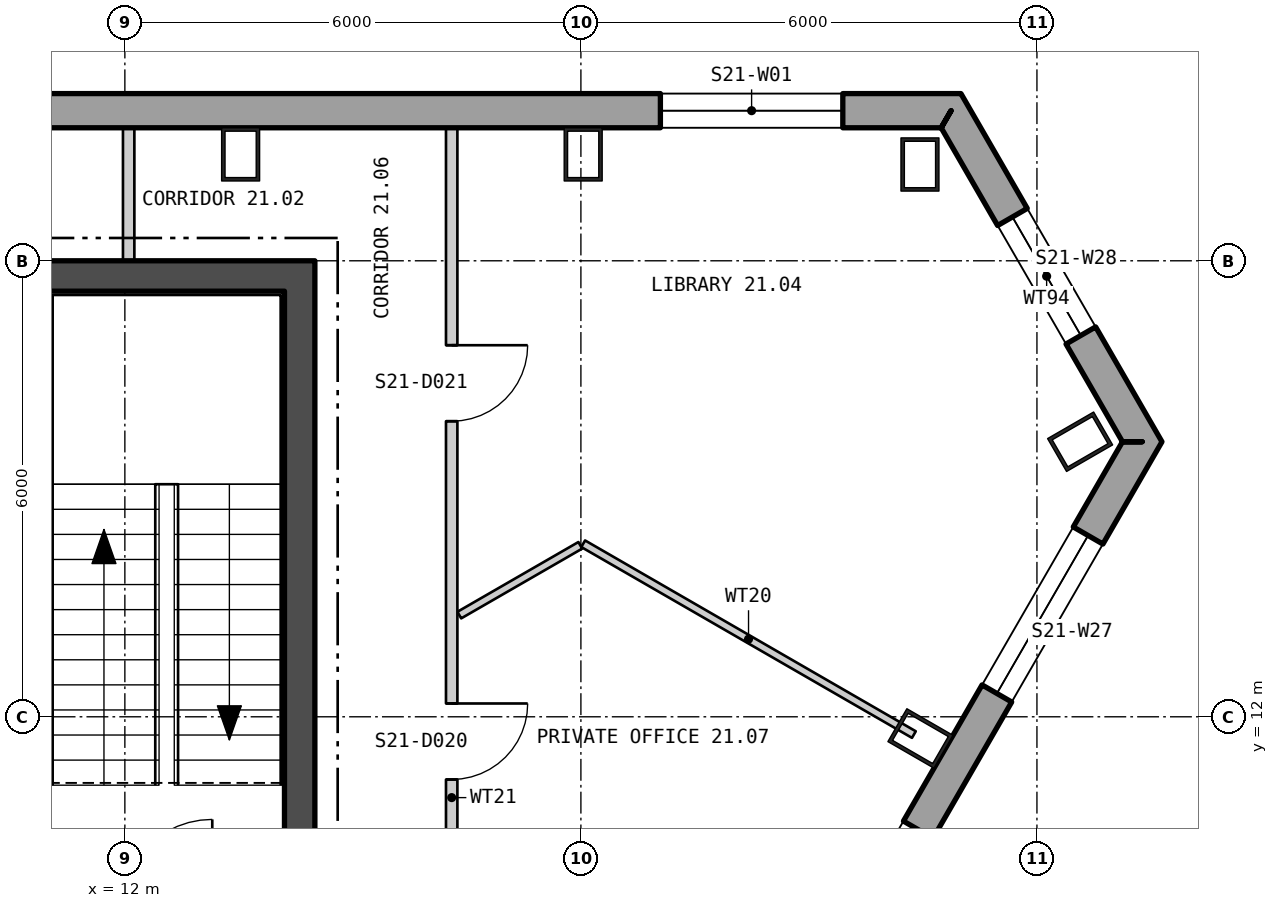
"""IFC4 building model, lengths in metres.
Left out: names, types, materials, properties, quantities, classifications, styles, units other than length and angle.
Written with IfcOpenShell. Run it as: python <this file> out.ifc"""

import sys

from ifc_helpers import new_model, si_unit, direction, frame, frame_2d, origin, origin_2d, place, context, subcontext, project, spatial, polyline, rectangle, hollow_rectangle, outline, extrude, element, fill, save


model = new_model("IFC4")
c1 = context("Model", 3, precision=1e-05, world=origin(), true_north=direction((0.0, 1.0)))
c2 = subcontext(c1, "Body", "Model", "MODEL_VIEW")
j1 = project(units=[si_unit("LENGTHUNIT", "METRE"), si_unit("PLANEANGLEUNIT", "RADIAN")], contexts=[c1])
p1 = place(None, origin())
s1 = spatial("IfcSite", under=j1, at=p1, CompositionType="ELEMENT")
p2 = place(p1, origin())
s2 = spatial("IfcBuilding", under=s1, at=p2, CompositionType="ELEMENT")
p3 = place(p2, frame((0.0, 0.0, 280.5)))
s3 = spatial("IfcBuildingStorey", under=s2, at=p3, CompositionType="ELEMENT", Elevation=280.5)
for number, where, z_axis, x_axis in (
    (1, (22.461, 19.267, 0.0), (0.0, 0.0, 1.0), (-1.0, 0.0, 0.0)),
    (2, (18.03, 19.4, 0.0), (0.0, 0.0, 1.0), (-1.0, 0.0, 0.0)),
    (3, (13.523, 19.4, 0.0), (0.0, 0.0, 1.0), (-1.0, 0.0, 0.0)),
    (4, (22.467, 11.715, 0.0), (0.0, 0.0, 1.0), (0.5, 0.866, 0.0)),
    (5, (24.568, 15.619, 0.0), (0.0, 0.0, 1.0), (-0.5, 0.866, 0.0)),
):
    element("IfcColumn", number, at=place(p3, frame(where, z_axis=z_axis, x_axis=x_axis)), inside=s3, PredefinedType="COLUMN", context=c2, shape_type="SweptSolid", body=[
        extrude(hollow_rectangle(XDim=0.5, YDim=0.7, WallThickness=0.045, at=origin_2d()), origin(), (0.0, 0.0, 1.0), 3.9),
    ])
p4 = place(p3, frame((22.87, 19.975, -0.4), z_axis=(0.0, 0.0, 1.0), x_axis=(-1.0, 0.0, 0.0)))
e6 = element("IfcWall", 6, at=p4, inside=s3, PredefinedType="SOLIDWALL", context=c2, shape_type="SweptSolid", body=[
    extrude(outline(polyline([(-0.13, -0.225), (45.87, -0.225), (45.61, 0.225), (0.13, 0.225), (-0.13, -0.225)])), origin(), (0.0, 0.0, 1.0), 3.9),
])
p5 = place(p4, frame((1.424, 0.0, 1.3)))
e7 = element("IfcOpeningElement", 7, at=p5, cuts=e6, PredefinedType="OPENING", context=c2, shape_type="SweptSolid", body=[
    extrude(rectangle(XDim=2.4, YDim=2.0, at=frame_2d((1.2, 1.0))), frame((0.0, 0.235, 0.0), z_axis=(0.0, -1.0, 0.0), x_axis=(1.0, 0.0, 0.0)), (0.0, 0.0, 1.0), 0.47),
])
p6 = place(p4, frame((14.909, 0.0, 1.3)))
e8 = element("IfcOpeningElement", 8, at=p6, cuts=e6, PredefinedType="OPENING", context=c2, shape_type="SweptSolid", body=[
    extrude(rectangle(XDim=2.4, YDim=2.0, at=frame_2d((1.2, 1.0))), frame((0.0, 0.235, 0.0), z_axis=(0.0, -1.0, 0.0), x_axis=(1.0, 0.0, 0.0)), (0.0, 0.0, 1.0), 0.47),
])
p7 = place(p4, frame((19.416, 0.0, 1.3)))
e9 = element("IfcOpeningElement", 9, at=p7, cuts=e6, PredefinedType="OPENING", context=c2, shape_type="SweptSolid", body=[
    extrude(rectangle(XDim=2.4, YDim=2.0, at=frame_2d((1.2, 1.0))), frame((0.0, 0.235, 0.0), z_axis=(0.0, -1.0, 0.0), x_axis=(1.0, 0.0, 0.0)), (0.0, 0.0, 1.0), 0.47),
])
p8 = place(p4, frame((23.924, 0.0, 1.3)))
e10 = element("IfcOpeningElement", 10, at=p8, cuts=e6, PredefinedType="OPENING", context=c2, shape_type="SweptSolid", body=[
    extrude(rectangle(XDim=2.4, YDim=2.0, at=frame_2d((1.2, 1.0))), frame((0.0, 0.235, 0.0), z_axis=(0.0, -1.0, 0.0), x_axis=(1.0, 0.0, 0.0)), (0.0, 0.0, 1.0), 0.47),
])
p9 = place(p4, frame((28.431, 0.0, 1.3)))
e11 = element("IfcOpeningElement", 11, at=p9, cuts=e6, PredefinedType="OPENING", context=c2, shape_type="SweptSolid", body=[
    extrude(rectangle(XDim=2.4, YDim=2.0, at=frame_2d((1.2, 1.0))), frame((0.0, 0.235, 0.0), z_axis=(0.0, -1.0, 0.0), x_axis=(1.0, 0.0, 0.0)), (0.0, 0.0, 1.0), 0.47),
])
p10 = place(p4, frame((32.939, 0.0, 1.3)))
e12 = element("IfcOpeningElement", 12, at=p10, cuts=e6, PredefinedType="OPENING", context=c2, shape_type="SweptSolid", body=[
    extrude(rectangle(XDim=2.4, YDim=2.0, at=frame_2d((1.2, 1.0))), frame((0.0, 0.235, 0.0), z_axis=(0.0, -1.0, 0.0), x_axis=(1.0, 0.0, 0.0)), (0.0, 0.0, 1.0), 0.47),
])
p11 = place(p4, frame((41.916, 0.0, 1.3)))
e13 = element("IfcOpeningElement", 13, at=p11, cuts=e6, PredefinedType="OPENING", context=c2, shape_type="SweptSolid", body=[
    extrude(rectangle(XDim=2.4, YDim=2.0, at=frame_2d((1.2, 1.0))), frame((0.0, 0.235, 0.0), z_axis=(0.0, -1.0, 0.0), x_axis=(1.0, 0.0, 0.0)), (0.0, 0.0, 1.0), 0.47),
])
p12 = place(p3, frame((2.515, -23.993, -0.18), z_axis=(0.0, 0.0, 1.0), x_axis=(0.500000711659, 0.866024992908, 0.0)))
e14 = element("IfcWall", 14, at=p12, inside=s3, PredefinedType="SOLIDWALL", context=c2, shape_type="SweptSolid", body=[
    extrude(outline(polyline([(-0.13, -0.225), (45.87, -0.225), (45.61, 0.225), (0.13, 0.225), (-0.13, -0.225)])), origin(), (0.0, 0.0, 1.0), 3.68),
])
p13 = place(p12, frame((1.424, 0.0, 1.08)))
e15 = element("IfcOpeningElement", 15, at=p13, cuts=e14, PredefinedType="OPENING", context=c2, shape_type="SweptSolid", body=[
    extrude(rectangle(XDim=2.4, YDim=2.0, at=frame_2d((1.2, 1.0))), frame((0.0, 0.235, 0.0), z_axis=(0.0, -1.0, 0.0), x_axis=(1.0, 0.0, 0.0)), (0.0, 0.0, 1.0), 0.47),
])
p14 = place(p12, frame((5.893, 0.0, 1.08)))
e16 = element("IfcOpeningElement", 16, at=p14, cuts=e14, PredefinedType="OPENING", context=c2, shape_type="SweptSolid", body=[
    extrude(rectangle(XDim=2.4, YDim=2.0, at=frame_2d((1.2, 1.0))), frame((0.0, 0.235, 0.0), z_axis=(0.0, -1.0, 0.0), x_axis=(1.0, 0.0, 0.0)), (0.0, 0.0, 1.0), 0.47),
])
p15 = place(p12, frame((10.401, 0.0, 1.08)))
e17 = element("IfcOpeningElement", 17, at=p15, cuts=e14, PredefinedType="OPENING", context=c2, shape_type="SweptSolid", body=[
    extrude(rectangle(XDim=2.4, YDim=2.0, at=frame_2d((1.2, 1.0))), frame((0.0, 0.235, 0.0), z_axis=(0.0, -1.0, 0.0), x_axis=(1.0, 0.0, 0.0)), (0.0, 0.0, 1.0), 0.47),
])
p16 = place(p12, frame((14.909, 0.0, 1.08)))
e18 = element("IfcOpeningElement", 18, at=p16, cuts=e14, PredefinedType="OPENING", context=c2, shape_type="SweptSolid", body=[
    extrude(rectangle(XDim=2.4, YDim=2.0, at=frame_2d((1.2, 1.0))), frame((0.0, 0.235, 0.0), z_axis=(0.0, -1.0, 0.0), x_axis=(1.0, 0.0, 0.0)), (0.0, 0.0, 1.0), 0.47),
])
p17 = place(p12, frame((19.416, 0.0, 1.08)))
e19 = element("IfcOpeningElement", 19, at=p17, cuts=e14, PredefinedType="OPENING", context=c2, shape_type="SweptSolid", body=[
    extrude(rectangle(XDim=2.4, YDim=2.0, at=frame_2d((1.2, 1.0))), frame((0.0, 0.235, 0.0), z_axis=(0.0, -1.0, 0.0), x_axis=(1.0, 0.0, 0.0)), (0.0, 0.0, 1.0), 0.47),
])
p18 = place(p12, frame((28.431, 0.0, 1.08)))
e20 = element("IfcOpeningElement", 20, at=p18, cuts=e14, PredefinedType="OPENING", context=c2, shape_type="SweptSolid", body=[
    extrude(rectangle(XDim=2.4, YDim=2.0, at=frame_2d((1.2, 1.0))), frame((0.0, 0.235, 0.0), z_axis=(0.0, -1.0, 0.0), x_axis=(1.0, 0.0, 0.0)), (0.0, 0.0, 1.0), 0.47),
])
p19 = place(p12, frame((37.447, 0.0, 1.08)))
e21 = element("IfcOpeningElement", 21, at=p19, cuts=e14, PredefinedType="OPENING", context=c2, shape_type="SweptSolid", body=[
    extrude(rectangle(XDim=2.4, YDim=2.0, at=frame_2d((1.2, 1.0))), frame((0.0, 0.235, 0.0), z_axis=(0.0, -1.0, 0.0), x_axis=(1.0, 0.0, 0.0)), (0.0, 0.0, 1.0), 0.47),
])
p20 = place(p12, frame((41.916, 0.0, 1.08)))
e22 = element("IfcOpeningElement", 22, at=p20, cuts=e14, PredefinedType="OPENING", context=c2, shape_type="SweptSolid", body=[
    extrude(rectangle(XDim=2.4, YDim=2.0, at=frame_2d((1.2, 1.0))), frame((0.0, 0.235, 0.0), z_axis=(0.0, -1.0, 0.0), x_axis=(1.0, 0.0, 0.0)), (0.0, 0.0, 1.0), 0.47),
])
p21 = place(p3, frame((25.385, 15.619, -0.4), z_axis=(0.0, 0.0, 1.0), x_axis=(-0.49999836324, 0.866026348766, 0.0)))
e23 = element("IfcWall", 23, at=p21, inside=s3, PredefinedType="SOLIDWALL", context=c2, shape_type="SweptSolid", body=[
    extrude(outline(polyline([(-0.13, -0.225), (5.16, -0.225), (4.9, 0.225), (0.13, 0.225), (-0.13, -0.225)])), origin(), (0.0, 0.0, 1.0), 3.9),
])
p22 = place(p21, frame((1.615, 0.0, 1.3)))
e24 = element("IfcOpeningElement", 24, at=p22, cuts=e23, PredefinedType="OPENING", context=c2, shape_type="SweptSolid", body=[
    extrude(rectangle(XDim=1.8, YDim=2.0, at=frame_2d((0.9, 1.0))), frame((0.0, 0.235, 0.0), z_axis=(0.0, -1.0, 0.0), x_axis=(1.0, 0.0, 0.0)), (0.0, 0.0, 1.0), 0.47),
])
p23 = place(p3, frame((-14.5, 17.8, 0.0), z_axis=(0.0, 0.0, 1.0), x_axis=(1.0, 0.0, 0.0)))
e25 = element("IfcWall", 25, at=p23, inside=s3, PredefinedType="SHEAR", context=c2, shape_type="SweptSolid", body=[
    extrude(rectangle(XDim=29.0, YDim=0.4, at=frame_2d((14.5, 0.0))), origin(), (0.0, 0.0, 1.0), 3.7),
])
p24 = place(p3, frame((14.3, 4.4, 0.0), z_axis=(0.0, 0.0, 1.0), x_axis=(0.0, 1.0, 0.0)))
e26 = element("IfcWall", 26, at=p24, inside=s3, PredefinedType="SHEAR", context=c2, shape_type="SweptSolid", body=[
    extrude(rectangle(XDim=13.2, YDim=0.4, at=frame_2d((6.6, 0.0))), origin(), (0.0, 0.0, 1.0), 3.7),
])
p25 = place(p24, frame((3.05, 0.0, 0.0)))
e27 = element("IfcOpeningElement", 27, at=p25, cuts=e26, PredefinedType="OPENING", context=c2, shape_type="SweptSolid", body=[
    extrude(rectangle(XDim=1.5, YDim=2.1, at=frame_2d((0.75, 1.05))), frame((0.0, 0.21, 0.0), z_axis=(0.0, -1.0, 0.0), x_axis=(1.0, 0.0, 0.0)), (0.0, 0.0, 1.0), 0.42),
])
p26 = place(p3, frame((12.05, 18.0, 0.0), z_axis=(0.0, 0.0, 1.0), x_axis=(0.0, 1.0, 0.0)))
e28 = element("IfcWall", 28, at=p26, inside=s3, PredefinedType="PARTITIONING", context=c2, shape_type="SweptSolid", body=[
    extrude(rectangle(XDim=1.75, YDim=0.15, at=frame_2d((0.875, 0.0))), origin(), (0.0, 0.0, 1.0), 3.7),
])
p27 = place(p3, frame((16.3, 2.125, 0.0), z_axis=(0.0, 0.0, 1.0), x_axis=(0.0, 1.0, 0.0)))
e29 = element("IfcWall", 29, at=p27, inside=s3, PredefinedType="PARTITIONING", context=c2, shape_type="SweptSolid", body=[
    extrude(rectangle(XDim=17.623, YDim=0.15, at=frame_2d((8.812, 0.0))), origin(), (0.0, 0.0, 1.0), 3.7),
])
p28 = place(p27, frame((3.377, 0.0, 0.0)))
e30 = element("IfcOpeningElement", 30, at=p28, cuts=e29, PredefinedType="OPENING", context=c2, shape_type="SweptSolid", body=[
    extrude(rectangle(XDim=1.0, YDim=2.1, at=frame_2d((0.5, 1.05))), frame((0.0, 0.085, 0.0), z_axis=(0.0, -1.0, 0.0), x_axis=(1.0, 0.0, 0.0)), (0.0, 0.0, 1.0), 0.17),
])
p29 = place(p27, frame((6.242, 0.0, 0.0)))
e31 = element("IfcOpeningElement", 31, at=p29, cuts=e29, PredefinedType="OPENING", context=c2, shape_type="SweptSolid", body=[
    extrude(rectangle(XDim=0.9, YDim=2.1, at=frame_2d((0.45, 1.05))), frame((0.0, 0.085, 0.0), z_axis=(0.0, -1.0, 0.0), x_axis=(1.0, 0.0, 0.0)), (0.0, 0.0, 1.0), 0.17),
])
p30 = place(p27, frame((9.05, 0.0, 0.0)))
e32 = element("IfcOpeningElement", 32, at=p30, cuts=e29, PredefinedType="OPENING", context=c2, shape_type="SweptSolid", body=[
    extrude(rectangle(XDim=1.0, YDim=2.1, at=frame_2d((0.5, 1.05))), frame((0.0, 0.085, 0.0), z_axis=(0.0, -1.0, 0.0), x_axis=(1.0, 0.0, 0.0)), (0.0, 0.0, 1.0), 0.17),
])
p31 = place(p27, frame((13.764, 0.0, 0.0)))
e33 = element("IfcOpeningElement", 33, at=p31, cuts=e29, PredefinedType="OPENING", context=c2, shape_type="SweptSolid", body=[
    extrude(rectangle(XDim=1.0, YDim=2.1, at=frame_2d((0.5, 1.05))), frame((0.0, 0.085, 0.0), z_axis=(0.0, -1.0, 0.0), x_axis=(1.0, 0.0, 0.0)), (0.0, 0.0, 1.0), 0.17),
])
p32 = place(p3, frame((16.4, 13.338, 0.0), z_axis=(0.0, 0.0, 1.0), x_axis=(0.866294275703, 0.499534010738, 0.0)))
e34 = element("IfcWall", 34, at=p32, inside=s3, PredefinedType="PARTITIONING", context=c2, shape_type="SweptSolid", body=[
    extrude(rectangle(XDim=1.838, YDim=0.1, at=frame_2d((0.919, 0.0))), origin(), (0.0, 0.0, 1.0), 3.7),
])
p33 = place(p3, frame((18.03, 14.277, 0.0), z_axis=(0.0, 0.0, 1.0), x_axis=(0.866115983499, -0.499843078503, 0.0)))
e35 = element("IfcWall", 35, at=p33, inside=s3, PredefinedType="PARTITIONING", context=c2, shape_type="SweptSolid", body=[
    extrude(rectangle(XDim=5.024, YDim=0.1, at=frame_2d((2.512, 0.0))), origin(), (0.0, 0.0, 1.0), 3.7),
])
p34 = place(p5, origin())
e36 = element("IfcWindow", 36, at=p34, inside=s3, PartitioningType="SINGLE_PANEL", PredefinedType="WINDOW", context=c2, shape_type="SweptSolid", body=[
    extrude(rectangle(XDim=2.4, YDim=2.0, at=frame_2d((1.2, 1.0))), frame((0.0, 0.105, 0.0), z_axis=(0.0, -1.0, 0.0), x_axis=(1.0, 0.0, 0.0)), (0.0, 0.0, 1.0), 0.06),
])
fill(e7, e36)
p35 = place(p19, origin())
e37 = element("IfcWindow", 37, at=p35, inside=s3, PartitioningType="SINGLE_PANEL", PredefinedType="WINDOW", context=c2, shape_type="SweptSolid", body=[
    extrude(rectangle(XDim=2.4, YDim=2.0, at=frame_2d((1.2, 1.0))), frame((0.0, 0.105, 0.0), z_axis=(0.0, -1.0, 0.0), x_axis=(1.0, 0.0, 0.0)), (0.0, 0.0, 1.0), 0.06),
])
fill(e21, e37)
p36 = place(p20, origin())
e38 = element("IfcWindow", 38, at=p36, inside=s3, PartitioningType="SINGLE_PANEL", PredefinedType="WINDOW", context=c2, shape_type="SweptSolid", body=[
    extrude(rectangle(XDim=2.4, YDim=2.0, at=frame_2d((1.2, 1.0))), frame((0.0, 0.105, 0.0), z_axis=(0.0, -1.0, 0.0), x_axis=(1.0, 0.0, 0.0)), (0.0, 0.0, 1.0), 0.06),
])
fill(e22, e38)
p37 = place(p22, origin())
e39 = element("IfcWindow", 39, at=p37, inside=s3, PartitioningType="SINGLE_PANEL", PredefinedType="WINDOW", context=c2, shape_type="SweptSolid", body=[
    extrude(rectangle(XDim=1.8, YDim=2.0, at=frame_2d((0.9, 1.0))), frame((0.0, 0.105, 0.0), z_axis=(0.0, -1.0, 0.0), x_axis=(1.0, 0.0, 0.0)), (0.0, 0.0, 1.0), 0.06),
])
fill(e24, e39)
p38 = place(p30, origin())
e40 = element("IfcDoor", 40, at=p38, inside=s3, OperationType="SINGLE_SWING_RIGHT", PredefinedType="DOOR", context=c2, shape_type="SweptSolid", body=[
    extrude(rectangle(XDim=1.0, YDim=2.1, at=frame_2d((0.5, 1.05))), frame((0.0, 0.025, 0.0), z_axis=(0.0, -1.0, 0.0), x_axis=(1.0, 0.0, 0.0)), (0.0, 0.0, 1.0), 0.05),
])
fill(e32, e40)
p39 = place(p31, origin())
e41 = element("IfcDoor", 41, at=p39, inside=s3, OperationType="SINGLE_SWING_RIGHT", PredefinedType="DOOR", context=c2, shape_type="SweptSolid", body=[
    extrude(rectangle(XDim=1.0, YDim=2.1, at=frame_2d((0.5, 1.05))), frame((0.0, 0.025, 0.0), z_axis=(0.0, -1.0, 0.0), x_axis=(1.0, 0.0, 0.0)), (0.0, 0.0, 1.0), 0.05),
])
fill(e33, e41)
save(model, sys.argv[1])
